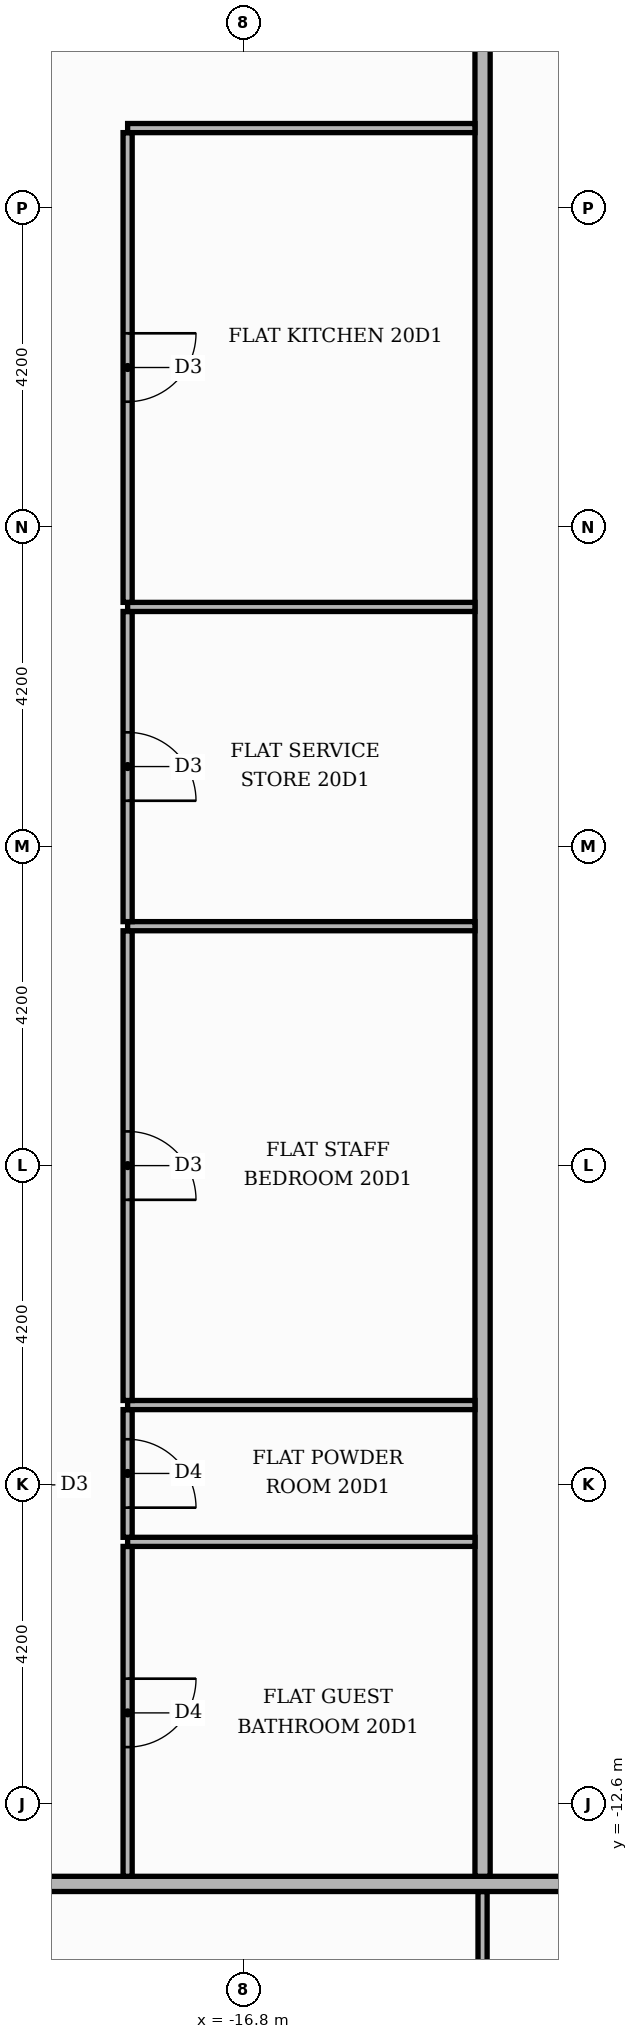
"""IFC4 building model, lengths in metres.
Left out: names, types, materials, properties, quantities, classifications, styles, units other than length and angle.
Written with IfcOpenShell. Run it as: python <this file> out.ifc"""

import sys

from ifc_helpers import new_model, si_unit, direction, frame, frame_2d, origin, place, context, subcontext, project, spatial, rectangle, extrude, element, fill, save


model = new_model("IFC4")
c1 = context("Model", 3, precision=1e-05, world=origin(), true_north=direction((0.0, 1.0)))
c2 = subcontext(c1, "Body", "Model", "MODEL_VIEW")
j1 = project(units=[si_unit("LENGTHUNIT", "METRE"), si_unit("PLANEANGLEUNIT", "RADIAN")], contexts=[c1])
p1 = place(None, origin())
s1 = spatial("IfcSite", under=j1, at=p1, CompositionType="ELEMENT")
p2 = place(p1, origin())
s2 = spatial("IfcBuilding", under=s1, at=p2, CompositionType="ELEMENT")
p3 = place(p2, frame((0.0, 0.0, 87.0)))
s3 = spatial("IfcBuildingStorey", under=s2, at=p3, CompositionType="ELEMENT", Elevation=87.0)
p4 = place(p3, frame((-13.65, -20.66, 0.0), z_axis=(0.0, 0.0, 1.0), x_axis=(0.0, 1.0, 0.0)))
e1 = element("IfcWall", 1, at=p4, inside=s3, PredefinedType="PARTITIONING", context=c2, shape_type="SweptSolid", body=[
    extrude(rectangle(XDim=6.91, YDim=0.12, at=frame_2d((3.455, 0.0))), origin(), (0.0, 0.0, 1.0), 3.48),
])
p5 = place(p4, frame((3.025, 0.0, 0.0)))
e2 = element("IfcOpeningElement", 2, at=p5, cuts=e1, PredefinedType="OPENING", context=c2, shape_type="SweptSolid", body=[
    extrude(rectangle(XDim=0.9, YDim=2.1, at=frame_2d((0.45, 1.05))), frame((0.0, 0.07, 0.0), z_axis=(0.0, -1.0, 0.0), x_axis=(1.0, 0.0, 0.0)), (0.0, 0.0, 1.0), 0.14),
])
p6 = place(p3, frame((-25.42, -13.65, 0.0), z_axis=(0.0, 0.0, 1.0), x_axis=(1.0, 0.0, 0.0)))
e3 = element("IfcWall", 3, at=p6, inside=s3, PredefinedType="PARTITIONING", context=c2, shape_type="SweptSolid", body=[
    extrude(rectangle(XDim=39.07, YDim=0.2, at=frame_2d((19.535, 0.0))), origin(), (0.0, 0.0, 1.0), 3.48),
])
p7 = place(p6, frame((14.37, 0.0, 0.0)))
e4 = element("IfcOpeningElement", 4, at=p7, cuts=e3, PredefinedType="OPENING", context=c2, shape_type="SweptSolid", body=[
    extrude(rectangle(XDim=1.1, YDim=2.4, at=frame_2d((0.55, 1.2))), frame((0.0, 0.11, 0.0), z_axis=(0.0, -1.0, 0.0), x_axis=(1.0, 0.0, 0.0)), (0.0, 0.0, 1.0), 0.22),
])
p8 = place(p3, frame((-18.32, -13.55, 0.0), z_axis=(0.0, 0.0, 1.0), x_axis=(0.0, 1.0, 0.0)))
e5 = element("IfcWall", 5, at=p8, inside=s3, PredefinedType="PARTITIONING", context=c2, shape_type="SweptSolid", body=[
    extrude(rectangle(XDim=4.34, YDim=0.12, at=frame_2d((2.17, 0.0))), origin(), (0.0, 0.0, 1.0), 3.48),
])
p9 = place(p8, frame((1.7, 0.0, 0.0)))
e6 = element("IfcOpeningElement", 6, at=p9, cuts=e5, PredefinedType="OPENING", context=c2, shape_type="SweptSolid", body=[
    extrude(rectangle(XDim=0.9, YDim=2.1, at=frame_2d((0.45, 1.05))), frame((0.0, 0.07, 0.0), z_axis=(0.0, -1.0, 0.0), x_axis=(1.0, 0.0, 0.0)), (0.0, 0.0, 1.0), 0.14),
])
p10 = place(p3, frame((-13.65, -13.55, 0.0), z_axis=(0.0, 0.0, 1.0), x_axis=(0.0, 1.0, 0.0)))
e7 = element("IfcWall", 7, at=p10, inside=s3, PredefinedType="PARTITIONING", context=c2, shape_type="SweptSolid", body=[
    extrude(rectangle(XDim=27.1, YDim=0.2, at=frame_2d((13.55, 0.0))), origin(), (0.0, 0.0, 1.0), 3.48),
])
p11 = place(p10, frame((24.55, 0.0, 0.0)))
e8 = element("IfcOpeningElement", 8, at=p11, cuts=e7, PredefinedType="OPENING", context=c2, shape_type="SweptSolid", body=[
    extrude(rectangle(XDim=1.1, YDim=2.4, at=frame_2d((0.55, 1.2))), frame((0.0, 0.11, 0.0), z_axis=(0.0, -1.0, 0.0), x_axis=(1.0, 0.0, 0.0)), (0.0, 0.0, 1.0), 0.22),
])
p12 = place(p3, frame((-18.32, -9.15, 0.0), z_axis=(0.0, 0.0, 1.0), x_axis=(1.0, 0.0, 0.0)))
e9 = element("IfcWall", 9, at=p12, inside=s3, PredefinedType="PARTITIONING", context=c2, shape_type="SweptSolid", body=[
    extrude(rectangle(XDim=4.57, YDim=0.12, at=frame_2d((2.285, 0.0))), origin(), (0.0, 0.0, 1.0), 3.48),
])
p13 = place(p3, frame((-18.32, -9.09, 0.0), z_axis=(0.0, 0.0, 1.0), x_axis=(0.0, 1.0, 0.0)))
e10 = element("IfcWall", 10, at=p13, inside=s3, PredefinedType="PARTITIONING", context=c2, shape_type="SweptSolid", body=[
    extrude(rectangle(XDim=1.68, YDim=0.12, at=frame_2d((0.84, 0.0))), origin(), (0.0, 0.0, 1.0), 3.48),
])
p14 = place(p13, frame((0.39, 0.0, 0.0)))
e11 = element("IfcOpeningElement", 11, at=p14, cuts=e10, PredefinedType="OPENING", context=c2, shape_type="SweptSolid", body=[
    extrude(rectangle(XDim=0.9, YDim=2.1, at=frame_2d((0.45, 1.05))), frame((0.0, 0.07, 0.0), z_axis=(0.0, -1.0, 0.0), x_axis=(1.0, 0.0, 0.0)), (0.0, 0.0, 1.0), 0.14),
])
p15 = place(p3, frame((-18.32, -7.35, 0.0), z_axis=(0.0, 0.0, 1.0), x_axis=(1.0, 0.0, 0.0)))
e12 = element("IfcWall", 12, at=p15, inside=s3, PredefinedType="PARTITIONING", context=c2, shape_type="SweptSolid", body=[
    extrude(rectangle(XDim=4.57, YDim=0.12, at=frame_2d((2.285, 0.0))), origin(), (0.0, 0.0, 1.0), 3.48),
])
p16 = place(p3, frame((-18.32, -7.29, 0.0), z_axis=(0.0, 0.0, 1.0), x_axis=(0.0, 1.0, 0.0)))
e13 = element("IfcWall", 13, at=p16, inside=s3, PredefinedType="PARTITIONING", context=c2, shape_type="SweptSolid", body=[
    extrude(rectangle(XDim=6.18, YDim=0.12, at=frame_2d((3.09, 0.0))), origin(), (0.0, 0.0, 1.0), 3.48),
])
p17 = place(p16, frame((2.64, 0.0, 0.0)))
e14 = element("IfcOpeningElement", 14, at=p17, cuts=e13, PredefinedType="OPENING", context=c2, shape_type="SweptSolid", body=[
    extrude(rectangle(XDim=0.9, YDim=2.1, at=frame_2d((0.45, 1.05))), frame((0.0, 0.07, 0.0), z_axis=(0.0, -1.0, 0.0), x_axis=(1.0, 0.0, 0.0)), (0.0, 0.0, 1.0), 0.14),
])
p18 = place(p3, frame((-18.32, -1.05, 0.0), z_axis=(0.0, 0.0, 1.0), x_axis=(1.0, 0.0, 0.0)))
e15 = element("IfcWall", 15, at=p18, inside=s3, PredefinedType="PARTITIONING", context=c2, shape_type="SweptSolid", body=[
    extrude(rectangle(XDim=4.57, YDim=0.12, at=frame_2d((2.285, 0.0))), origin(), (0.0, 0.0, 1.0), 3.48),
])
p19 = place(p3, frame((-18.32, -0.99, 0.0), z_axis=(0.0, 0.0, 1.0), x_axis=(0.0, 1.0, 0.0)))
e16 = element("IfcWall", 16, at=p19, inside=s3, PredefinedType="PARTITIONING", context=c2, shape_type="SweptSolid", body=[
    extrude(rectangle(XDim=4.08, YDim=0.12, at=frame_2d((2.04, 0.0))), origin(), (0.0, 0.0, 1.0), 3.48),
])
p20 = place(p19, frame((1.59, 0.0, 0.0)))
e17 = element("IfcOpeningElement", 17, at=p20, cuts=e16, PredefinedType="OPENING", context=c2, shape_type="SweptSolid", body=[
    extrude(rectangle(XDim=0.9, YDim=2.1, at=frame_2d((0.45, 1.05))), frame((0.0, 0.07, 0.0), z_axis=(0.0, -1.0, 0.0), x_axis=(1.0, 0.0, 0.0)), (0.0, 0.0, 1.0), 0.14),
])
p21 = place(p3, frame((-18.32, 3.15, 0.0), z_axis=(0.0, 0.0, 1.0), x_axis=(1.0, 0.0, 0.0)))
e18 = element("IfcWall", 18, at=p21, inside=s3, PredefinedType="PARTITIONING", context=c2, shape_type="SweptSolid", body=[
    extrude(rectangle(XDim=4.57, YDim=0.12, at=frame_2d((2.285, 0.0))), origin(), (0.0, 0.0, 1.0), 3.48),
])
p22 = place(p3, frame((-18.32, 3.21, 0.0), z_axis=(0.0, 0.0, 1.0), x_axis=(0.0, 1.0, 0.0)))
e19 = element("IfcWall", 19, at=p22, inside=s3, PredefinedType="PARTITIONING", context=c2, shape_type="SweptSolid", body=[
    extrude(rectangle(XDim=6.18, YDim=0.12, at=frame_2d((3.09, 0.0))), origin(), (0.0, 0.0, 1.0), 3.48),
])
p23 = place(p22, frame((2.64, 0.0, 0.0)))
e20 = element("IfcOpeningElement", 20, at=p23, cuts=e19, PredefinedType="OPENING", context=c2, shape_type="SweptSolid", body=[
    extrude(rectangle(XDim=0.9, YDim=2.1, at=frame_2d((0.45, 1.05))), frame((0.0, 0.07, 0.0), z_axis=(0.0, -1.0, 0.0), x_axis=(1.0, 0.0, 0.0)), (0.0, 0.0, 1.0), 0.14),
])
p24 = place(p3, frame((-18.32, 9.45, 0.0), z_axis=(0.0, 0.0, 1.0), x_axis=(1.0, 0.0, 0.0)))
e21 = element("IfcWall", 21, at=p24, inside=s3, PredefinedType="PARTITIONING", context=c2, shape_type="SweptSolid", body=[
    extrude(rectangle(XDim=4.57, YDim=0.12, at=frame_2d((2.285, 0.0))), origin(), (0.0, 0.0, 1.0), 3.48),
])
p25 = place(p23, frame((0.9, 0.0, 0.0), z_axis=(0.0, 0.0, 1.0), x_axis=(-1.0, 0.0, 0.0)))
e22 = element("IfcDoor", 22, at=p25, inside=s3, OperationType="SINGLE_SWING_RIGHT", PredefinedType="DOOR", context=c2, shape_type="SweptSolid", body=[
    extrude(rectangle(XDim=0.9, YDim=2.1, at=frame_2d((0.45, 1.05))), frame((0.0, 0.025, 0.0), z_axis=(0.0, -1.0, 0.0), x_axis=(1.0, 0.0, 0.0)), (0.0, 0.0, 1.0), 0.05),
])
fill(e20, e22)
p26 = place(p20, frame((0.9, 0.0, 0.0), z_axis=(0.0, 0.0, 1.0), x_axis=(-1.0, 0.0, 0.0)))
e23 = element("IfcDoor", 23, at=p26, inside=s3, OperationType="SINGLE_SWING_LEFT", PredefinedType="DOOR", context=c2, shape_type="SweptSolid", body=[
    extrude(rectangle(XDim=0.9, YDim=2.1, at=frame_2d((0.45, 1.05))), frame((0.0, 0.025, 0.0), z_axis=(0.0, -1.0, 0.0), x_axis=(1.0, 0.0, 0.0)), (0.0, 0.0, 1.0), 0.05),
])
fill(e17, e23)
p27 = place(p17, frame((0.9, 0.0, 0.0), z_axis=(0.0, 0.0, 1.0), x_axis=(-1.0, 0.0, 0.0)))
e24 = element("IfcDoor", 24, at=p27, inside=s3, OperationType="SINGLE_SWING_LEFT", PredefinedType="DOOR", context=c2, shape_type="SweptSolid", body=[
    extrude(rectangle(XDim=0.9, YDim=2.1, at=frame_2d((0.45, 1.05))), frame((0.0, 0.025, 0.0), z_axis=(0.0, -1.0, 0.0), x_axis=(1.0, 0.0, 0.0)), (0.0, 0.0, 1.0), 0.05),
])
fill(e14, e24)
p28 = place(p14, frame((0.9, 0.0, 0.0), z_axis=(0.0, 0.0, 1.0), x_axis=(-1.0, 0.0, 0.0)))
e25 = element("IfcDoor", 25, at=p28, inside=s3, OperationType="SINGLE_SWING_LEFT", PredefinedType="DOOR", context=c2, shape_type="SweptSolid", body=[
    extrude(rectangle(XDim=0.9, YDim=2.1, at=frame_2d((0.45, 1.05))), frame((0.0, 0.025, 0.0), z_axis=(0.0, -1.0, 0.0), x_axis=(1.0, 0.0, 0.0)), (0.0, 0.0, 1.0), 0.05),
])
fill(e11, e25)
p29 = place(p9, frame((0.9, 0.0, 0.0), z_axis=(0.0, 0.0, 1.0), x_axis=(-1.0, 0.0, 0.0)))
e26 = element("IfcDoor", 26, at=p29, inside=s3, OperationType="SINGLE_SWING_RIGHT", PredefinedType="DOOR", context=c2, shape_type="SweptSolid", body=[
    extrude(rectangle(XDim=0.9, YDim=2.1, at=frame_2d((0.45, 1.05))), frame((0.0, 0.025, 0.0), z_axis=(0.0, -1.0, 0.0), x_axis=(1.0, 0.0, 0.0)), (0.0, 0.0, 1.0), 0.05),
])
fill(e6, e26)
save(model, sys.argv[1])
